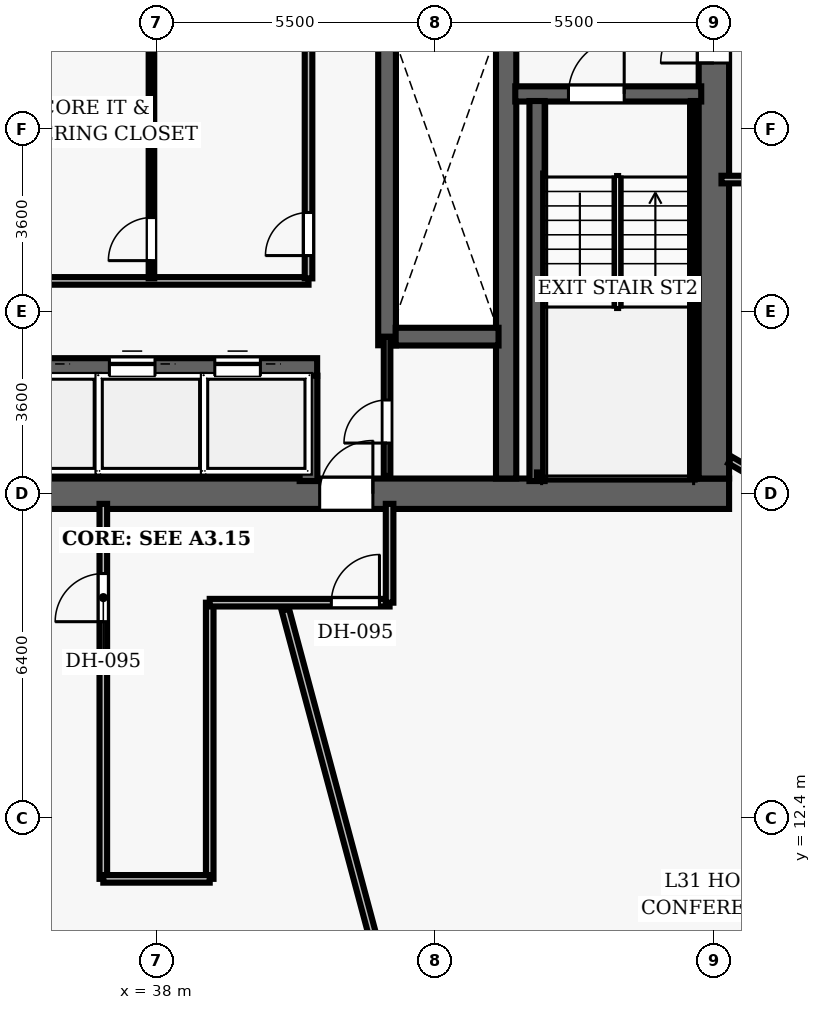
"""IFC4 building model, lengths in metres.
Left out: names, types, materials, properties, quantities, classifications, styles, units other than length and angle.
Written with IfcOpenShell. Run it as: python <this file> out.ifc"""

import sys

from ifc_helpers import new_model, si_unit, direction, frame, frame_2d, origin, place, context, subcontext, project, spatial, rectangle, extrude, element, fill, save


model = new_model("IFC4")
c1 = context("Model", 3, precision=1e-05, world=origin(), true_north=direction((0.0, 1.0)))
c2 = subcontext(c1, "Body", "Model", "MODEL_VIEW")
j1 = project(units=[si_unit("LENGTHUNIT", "METRE"), si_unit("PLANEANGLEUNIT", "RADIAN")], contexts=[c1])
p1 = place(None, origin())
s1 = spatial("IfcSite", under=j1, at=p1, CompositionType="ELEMENT")
p2 = place(p1, origin())
s2 = spatial("IfcBuilding", under=s1, at=p2, CompositionType="ELEMENT")
p3 = place(p2, frame((0.0, 0.0, 127.3)))
s3 = spatial("IfcBuildingStorey", under=s2, at=p3, CompositionType="ELEMENT", Elevation=127.3)
p4 = place(p3, frame((26.7, 18.8, 0.0), z_axis=(0.0, 0.0, 1.0), x_axis=(1.0, 0.0, 0.0)))
e1 = element("IfcWall", 1, at=p4, inside=s3, PredefinedType="SHEAR", context=c2, shape_type="SweptSolid", body=[
    extrude(rectangle(XDim=22.6, YDim=0.6, at=frame_2d((11.3, 0.0))), origin(), (0.0, 0.0, 1.0), 3.5),
])
p5 = place(p4, frame((14.52, 0.0, 0.0)))
e2 = element("IfcOpeningElement", 2, at=p5, cuts=e1, PredefinedType="OPENING", context=c2, shape_type="SweptSolid", body=[
    extrude(rectangle(XDim=1.05, YDim=2.15, at=frame_2d((0.525, 1.075))), frame((0.0, 0.31, 0.0), z_axis=(0.0, -1.0, 0.0), x_axis=(1.0, 0.0, 0.0)), (0.0, 0.0, 1.0), 0.62),
])
p6 = place(p3, frame((49.0, 19.1, 0.0), z_axis=(0.0, 0.0, 1.0), x_axis=(0.0, 1.0, 0.0)))
e3 = element("IfcWall", 3, at=p6, inside=s3, PredefinedType="SHEAR", context=c2, shape_type="SweptSolid", body=[
    extrude(rectangle(XDim=13.8, YDim=0.6, at=frame_2d((6.9, 0.0))), origin(), (0.0, 0.0, 1.0), 3.5),
])
p7 = place(p6, frame((8.2, 0.0, 0.0)))
e4 = element("IfcOpeningElement", 4, at=p7, cuts=e3, PredefinedType="OPENING", context=c2, shape_type="SweptSolid", body=[
    extrude(rectangle(XDim=1.05, YDim=2.15, at=frame_2d((0.525, 1.075))), frame((0.0, 0.31, 0.0), z_axis=(0.0, -1.0, 0.0), x_axis=(1.0, 0.0, 0.0)), (0.0, 0.0, 1.0), 0.62),
])
p8 = place(p3, frame((44.9, 19.1, 0.0), z_axis=(0.0, 0.0, 1.0), x_axis=(0.0, 1.0, 0.0)))
e5 = element("IfcWall", 5, at=p8, inside=s3, PredefinedType="SHEAR", context=c2, shape_type="SweptSolid", body=[
    extrude(rectangle(XDim=13.8, YDim=0.4, at=frame_2d((6.9, 0.0))), origin(), (0.0, 0.0, 1.0), 3.5),
])
p9 = place(p3, frame((45.08, 26.69, 0.0), z_axis=(0.0, 0.0, 1.0), x_axis=(1.0, 0.0, 0.0)))
e6 = element("IfcWall", 6, at=p9, inside=s3, PredefinedType="SHEAR", context=c2, shape_type="SweptSolid", body=[
    extrude(rectangle(XDim=3.67, YDim=0.3, at=frame_2d((1.835, 0.0))), origin(), (0.0, 0.0, 1.0), 3.5),
])
p10 = place(p9, frame((1.05, 0.0, 0.0)))
e7 = element("IfcOpeningElement", 7, at=p10, cuts=e6, PredefinedType="OPENING", context=c2, shape_type="SweptSolid", body=[
    extrude(rectangle(XDim=1.1, YDim=2.15, at=frame_2d((0.55, 1.075))), frame((0.0, 0.16, 0.0), z_axis=(0.0, -1.0, 0.0), x_axis=(1.0, 0.0, 0.0)), (0.0, 0.0, 1.0), 0.32),
])
p11 = place(p3, frame((45.51, 19.05, 0.0), z_axis=(0.0, 0.0, 1.0), x_axis=(0.0, 1.0, 0.0)))
e8 = element("IfcWall", 8, at=p11, inside=s3, PredefinedType="SHEAR", context=c2, shape_type="SweptSolid", body=[
    extrude(rectangle(XDim=7.5, YDim=0.3, at=frame_2d((3.75, 0.0))), origin(), (0.0, 0.0, 1.0), 3.5),
])
p12 = place(p3, frame((48.605, 19.1, 0.0), z_axis=(0.0, 0.0, 1.0), x_axis=(0.0, 1.0, 0.0)))
e9 = element("IfcWall", 9, at=p12, inside=s3, PredefinedType="SHEAR", context=c2, shape_type="SweptSolid", body=[
    extrude(rectangle(XDim=7.45, YDim=0.12, at=frame_2d((3.725, 0.0))), origin(), (0.0, 0.0, 1.0), 3.5),
])
p13 = place(p3, frame((45.51, 19.16, 0.0), z_axis=(0.0, 0.0, 1.0), x_axis=(1.0, 0.0, 0.0)))
e10 = element("IfcWall", 10, at=p13, inside=s3, PredefinedType="SHEAR", context=c2, shape_type="SweptSolid", body=[
    extrude(rectangle(XDim=3.095, YDim=0.12, at=frame_2d((1.547, 0.0))), origin(), (0.0, 0.0, 1.0), 3.5),
])
p14 = place(p3, frame((42.55, 21.73, 0.0), z_axis=(0.0, 0.0, 1.0), x_axis=(0.0, 1.0, 0.0)))
e11 = element("IfcWall", 11, at=p14, inside=s3, PredefinedType="SHEAR", context=c2, shape_type="SweptSolid", body=[
    extrude(rectangle(XDim=6.54, YDim=0.35, at=frame_2d((3.27, 0.0))), origin(), (0.0, 0.0, 1.0), 2.675),
])
p15 = place(p3, frame((42.72, 21.9, 0.0), z_axis=(0.0, 0.0, 1.0), x_axis=(1.0, 0.0, 0.0)))
e12 = element("IfcWall", 12, at=p15, inside=s3, PredefinedType="SHEAR", context=c2, shape_type="SweptSolid", body=[
    extrude(rectangle(XDim=2.03, YDim=0.35, at=frame_2d((1.015, 0.0))), origin(), (0.0, 0.0, 1.0), 2.675),
])
p16 = place(p3, frame((34.49, 21.3, 0.0), z_axis=(0.0, 0.0, 1.0), x_axis=(1.0, 0.0, 0.0)))
e13 = element("IfcWall", 13, at=p16, inside=s3, PredefinedType="SHEAR", context=c2, shape_type="SweptSolid", body=[
    extrude(rectangle(XDim=6.68, YDim=0.35, at=frame_2d((3.34, 0.0))), origin(), (0.0, 0.0, 1.0), 2.675),
])
p17 = place(p16, frame((0.5, 0.0, 0.0)))
e14 = element("IfcOpeningElement", 14, at=p17, cuts=e13, PredefinedType="OPENING", context=c2, shape_type="SweptSolid", body=[
    extrude(rectangle(XDim=0.9, YDim=2.15, at=frame_2d((0.45, 1.075))), frame((0.0, 0.185, 0.0), z_axis=(0.0, -1.0, 0.0), x_axis=(1.0, 0.0, 0.0)), (0.0, 0.0, 1.0), 0.37),
])
p18 = place(p16, frame((2.58, 0.0, 0.0)))
e15 = element("IfcOpeningElement", 15, at=p18, cuts=e13, PredefinedType="OPENING", context=c2, shape_type="SweptSolid", body=[
    extrude(rectangle(XDim=0.9, YDim=2.15, at=frame_2d((0.45, 1.075))), frame((0.0, 0.185, 0.0), z_axis=(0.0, -1.0, 0.0), x_axis=(1.0, 0.0, 0.0)), (0.0, 0.0, 1.0), 0.37),
])
p19 = place(p16, frame((4.66, 0.0, 0.0)))
e16 = element("IfcOpeningElement", 16, at=p19, cuts=e13, PredefinedType="OPENING", context=c2, shape_type="SweptSolid", body=[
    extrude(rectangle(XDim=0.9, YDim=2.15, at=frame_2d((0.45, 1.075))), frame((0.0, 0.185, 0.0), z_axis=(0.0, -1.0, 0.0), x_axis=(1.0, 0.0, 0.0)), (0.0, 0.0, 1.0), 0.37),
])
p20 = place(p3, frame((41.0, 19.05, 0.0), z_axis=(0.0, 0.0, 1.0), x_axis=(0.0, 1.0, 0.0)))
e17 = element("IfcWall", 17, at=p20, inside=s3, PredefinedType="SHEAR", context=c2, shape_type="SweptSolid", body=[
    extrude(rectangle(XDim=2.08, YDim=0.35, at=frame_2d((1.04, 0.0))), origin(), (0.0, 0.0, 1.0), 2.675),
])
p21 = place(p3, frame((34.75, 23.0, 0.0), z_axis=(0.0, 0.0, 1.0), x_axis=(1.0, 0.0, 0.0)))
e18 = element("IfcWall", 18, at=p21, inside=s3, PredefinedType="PARTITIONING", context=c2, shape_type="SweptSolid", body=[
    extrude(rectangle(XDim=6.25, YDim=0.15, at=frame_2d((3.125, 0.0))), origin(), (0.0, 0.0, 1.0), 2.675),
])
p22 = place(p3, frame((41.0, 23.05, 0.0), z_axis=(0.0, 0.0, 1.0), x_axis=(0.0, 1.0, 0.0)))
e19 = element("IfcWall", 19, at=p22, inside=s3, PredefinedType="PARTITIONING", context=c2, shape_type="SweptSolid", body=[
    extrude(rectangle(XDim=9.8, YDim=0.15, at=frame_2d((4.9, 0.0))), origin(), (0.0, 0.0, 1.0), 2.675),
])
p23 = place(p22, frame((5.35, 0.0, 0.0)))
e20 = element("IfcOpeningElement", 20, at=p23, cuts=e19, PredefinedType="OPENING", context=c2, shape_type="SweptSolid", body=[
    extrude(rectangle(XDim=0.85, YDim=2.1, at=frame_2d((0.425, 1.05))), frame((0.0, 0.085, 0.0), z_axis=(0.0, -1.0, 0.0), x_axis=(1.0, 0.0, 0.0)), (0.0, 0.0, 1.0), 0.17),
])
p24 = place(p22, frame((0.45, 0.0, 0.0)))
e21 = element("IfcOpeningElement", 21, at=p24, cuts=e19, PredefinedType="OPENING", context=c2, shape_type="SweptSolid", body=[
    extrude(rectangle(XDim=0.85, YDim=2.1, at=frame_2d((0.425, 1.05))), frame((0.0, 0.085, 0.0), z_axis=(0.0, -1.0, 0.0), x_axis=(1.0, 0.0, 0.0)), (0.0, 0.0, 1.0), 0.17),
])
p25 = place(p3, frame((37.9, 23.05, 0.0), z_axis=(0.0, 0.0, 1.0), x_axis=(0.0, 1.0, 0.0)))
e22 = element("IfcWall", 22, at=p25, inside=s3, PredefinedType="PARTITIONING", context=c2, shape_type="SweptSolid", body=[
    extrude(rectangle(XDim=4.9, YDim=0.11, at=frame_2d((2.45, 0.0))), origin(), (0.0, 0.0, 1.0), 2.675),
])
p26 = place(p25, frame((0.35, 0.0, 0.0)))
e23 = element("IfcOpeningElement", 23, at=p26, cuts=e22, PredefinedType="OPENING", context=c2, shape_type="SweptSolid", body=[
    extrude(rectangle(XDim=0.85, YDim=2.1, at=frame_2d((0.425, 1.05))), frame((0.0, 0.065, 0.0), z_axis=(0.0, -1.0, 0.0), x_axis=(1.0, 0.0, 0.0)), (0.0, 0.0, 1.0), 0.13),
])
p27 = place(p3, frame((42.55, 19.15, 0.0), z_axis=(0.0, 0.0, 1.0), x_axis=(0.0, 1.0, 0.0)))
e24 = element("IfcWall", 24, at=p27, inside=s3, PredefinedType="PARTITIONING", context=c2, shape_type="SweptSolid", body=[
    extrude(rectangle(XDim=2.75, YDim=0.13, at=frame_2d((1.375, 0.0))), origin(), (0.0, 0.0, 1.0), 2.675),
])
p28 = place(p27, frame((0.65, 0.0, 0.0)))
e25 = element("IfcOpeningElement", 25, at=p28, cuts=e24, PredefinedType="OPENING", context=c2, shape_type="SweptSolid", body=[
    extrude(rectangle(XDim=0.85, YDim=2.1, at=frame_2d((0.425, 1.05))), frame((0.0, 0.075, 0.0), z_axis=(0.0, -1.0, 0.0), x_axis=(1.0, 0.0, 0.0)), (0.0, 0.0, 1.0), 0.15),
])
p29 = place(p3, frame((49.15, 25.0, 0.0), z_axis=(0.0, 0.0, 1.0), x_axis=(1.0, 0.0, 0.0)))
e26 = element("IfcWall", 26, at=p29, inside=s3, PredefinedType="PARTITIONING", context=c2, shape_type="SweptSolid", body=[
    extrude(rectangle(XDim=12.35, YDim=0.15, at=frame_2d((6.175, 0.0))), origin(), (0.0, 0.0, 1.0), 2.675),
])
p30 = place(p29, frame((2.613, 0.0, 0.0)))
e27 = element("IfcOpeningElement", 27, at=p30, cuts=e26, PredefinedType="OPENING", context=c2, shape_type="SweptSolid", body=[
    extrude(rectangle(XDim=0.95, YDim=2.15, at=frame_2d((0.475, 1.075))), frame((0.0, 0.085, 0.0), z_axis=(0.0, -1.0, 0.0), x_axis=(1.0, 0.0, 0.0)), (0.0, 0.0, 1.0), 0.17),
])
p31 = place(p3, frame((36.95, 11.2, 0.0), z_axis=(0.0, 0.0, 1.0), x_axis=(0.0, 1.0, 0.0)))
e28 = element("IfcWall", 28, at=p31, inside=s3, PredefinedType="PARTITIONING", context=c2, shape_type="SweptSolid", body=[
    extrude(rectangle(XDim=7.4, YDim=0.15, at=frame_2d((3.7, 0.0))), origin(), (0.0, 0.0, 1.0), 2.675),
])
p32 = place(p31, frame((5.075, 0.0, 0.0)))
e29 = element("IfcOpeningElement", 29, at=p32, cuts=e28, PredefinedType="OPENING", context=c2, shape_type="SweptSolid", body=[
    extrude(rectangle(XDim=0.95, YDim=2.15, at=frame_2d((0.475, 1.075))), frame((0.0, 0.085, 0.0), z_axis=(0.0, -1.0, 0.0), x_axis=(1.0, 0.0, 0.0)), (0.0, 0.0, 1.0), 0.17),
])
p33 = place(p3, frame((39.05, 11.2, 0.0), z_axis=(0.0, 0.0, 1.0), x_axis=(0.0, 1.0, 0.0)))
e30 = element("IfcWall", 30, at=p33, inside=s3, PredefinedType="PARTITIONING", context=c2, shape_type="SweptSolid", body=[
    extrude(rectangle(XDim=5.45, YDim=0.15, at=frame_2d((2.725, 0.0))), origin(), (0.0, 0.0, 1.0), 2.675),
])
p34 = place(p3, frame((39.05, 16.65, 0.0), z_axis=(0.0, 0.0, 1.0), x_axis=(1.0, 0.0, 0.0)))
e31 = element("IfcWall", 31, at=p34, inside=s3, PredefinedType="PARTITIONING", context=c2, shape_type="SweptSolid", body=[
    extrude(rectangle(XDim=3.55, YDim=0.15, at=frame_2d((1.775, 0.0))), origin(), (0.0, 0.0, 1.0), 2.675),
])
p35 = place(p34, frame((2.4, 0.0, 0.0)))
e32 = element("IfcOpeningElement", 32, at=p35, cuts=e31, PredefinedType="OPENING", context=c2, shape_type="SweptSolid", body=[
    extrude(rectangle(XDim=0.95, YDim=2.15, at=frame_2d((0.475, 1.075))), frame((0.0, 0.085, 0.0), z_axis=(0.0, -1.0, 0.0), x_axis=(1.0, 0.0, 0.0)), (0.0, 0.0, 1.0), 0.17),
])
p36 = place(p3, frame((42.6, 16.65, 0.0), z_axis=(0.0, 0.0, 1.0), x_axis=(0.0, 1.0, 0.0)))
e33 = element("IfcWall", 33, at=p36, inside=s3, PredefinedType="PARTITIONING", context=c2, shape_type="SweptSolid", body=[
    extrude(rectangle(XDim=1.95, YDim=0.15, at=frame_2d((0.975, 0.0))), origin(), (0.0, 0.0, 1.0), 2.675),
])
p37 = place(p3, frame((36.95, 11.2, 0.0), z_axis=(0.0, 0.0, 1.0), x_axis=(1.0, 0.0, 0.0)))
e34 = element("IfcWall", 34, at=p37, inside=s3, PredefinedType="PARTITIONING", context=c2, shape_type="SweptSolid", body=[
    extrude(rectangle(XDim=2.1, YDim=0.15, at=frame_2d((1.05, 0.0))), origin(), (0.0, 0.0, 1.0), 2.675),
])
p38 = place(p3, frame((40.543, 16.51, 0.0), z_axis=(0.0, 0.0, 1.0), x_axis=(0.258819472716, -0.96592571171, 0.0)))
e35 = element("IfcWall", 35, at=p38, inside=s3, PredefinedType="PARTITIONING", context=c2, shape_type="SweptSolid", body=[
    extrude(rectangle(XDim=15.025, YDim=0.15, at=frame_2d((7.512, 0.0))), origin(), (0.0, 0.0, 1.0), 2.675),
])
p39 = place(p3, frame((49.32, 19.464, 0.0), z_axis=(0.0, 0.0, 1.0), x_axis=(0.866026939975, -0.499997339231, 0.0)))
e36 = element("IfcWall", 36, at=p39, inside=s3, PredefinedType="PARTITIONING", context=c2, shape_type="SweptSolid", body=[
    extrude(rectangle(XDim=17.272, YDim=0.15, at=frame_2d((8.636, 0.0))), origin(), (0.0, 0.0, 1.0), 2.675),
])
p40 = place(p10, origin())
e37 = element("IfcDoor", 37, at=p40, inside=s3, OperationType="SINGLE_SWING_RIGHT", PredefinedType="DOOR", context=c2, shape_type="SweptSolid", body=[
    extrude(rectangle(XDim=1.1, YDim=2.15, at=frame_2d((0.55, 1.075))), frame((0.0, 0.025, 0.0), z_axis=(0.0, -1.0, 0.0), x_axis=(1.0, 0.0, 0.0)), (0.0, 0.0, 1.0), 0.05),
])
fill(e7, e37)
p41 = place(p7, origin())
e38 = element("IfcDoor", 38, at=p41, inside=s3, OperationType="SINGLE_SWING_LEFT", PredefinedType="DOOR", context=c2, shape_type="SweptSolid", body=[
    extrude(rectangle(XDim=1.05, YDim=2.15, at=frame_2d((0.525, 1.075))), frame((0.0, 0.025, 0.0), z_axis=(0.0, -1.0, 0.0), x_axis=(1.0, 0.0, 0.0)), (0.0, 0.0, 1.0), 0.05),
])
fill(e4, e38)
p42 = place(p5, origin())
e39 = element("IfcDoor", 39, at=p42, inside=s3, OperationType="SINGLE_SWING_RIGHT", PredefinedType="DOOR", context=c2, shape_type="SweptSolid", body=[
    extrude(rectangle(XDim=1.05, YDim=2.15, at=frame_2d((0.525, 1.075))), frame((0.0, 0.025, 0.0), z_axis=(0.0, -1.0, 0.0), x_axis=(1.0, 0.0, 0.0)), (0.0, 0.0, 1.0), 0.05),
])
fill(e2, e39)
p43 = place(p24, origin())
e40 = element("IfcDoor", 40, at=p43, inside=s3, OperationType="SINGLE_SWING_LEFT", PredefinedType="DOOR", context=c2, shape_type="SweptSolid", body=[
    extrude(rectangle(XDim=0.85, YDim=2.1, at=frame_2d((0.425, 1.05))), frame((0.0, 0.025, 0.0), z_axis=(0.0, -1.0, 0.0), x_axis=(1.0, 0.0, 0.0)), (0.0, 0.0, 1.0), 0.05),
])
fill(e21, e40)
p44 = place(p26, origin())
e41 = element("IfcDoor", 41, at=p44, inside=s3, OperationType="SINGLE_SWING_LEFT", PredefinedType="DOOR", context=c2, shape_type="SweptSolid", body=[
    extrude(rectangle(XDim=0.85, YDim=2.1, at=frame_2d((0.425, 1.05))), frame((0.0, 0.025, 0.0), z_axis=(0.0, -1.0, 0.0), x_axis=(1.0, 0.0, 0.0)), (0.0, 0.0, 1.0), 0.05),
])
fill(e23, e41)
p45 = place(p28, origin())
e42 = element("IfcDoor", 42, at=p45, inside=s3, OperationType="SINGLE_SWING_LEFT", PredefinedType="DOOR", context=c2, shape_type="SweptSolid", body=[
    extrude(rectangle(XDim=0.85, YDim=2.1, at=frame_2d((0.425, 1.05))), frame((0.0, 0.025, 0.0), z_axis=(0.0, -1.0, 0.0), x_axis=(1.0, 0.0, 0.0)), (0.0, 0.0, 1.0), 0.05),
])
fill(e25, e42)
p46 = place(p32, origin())
e43 = element("IfcDoor", 43, at=p46, inside=s3, OperationType="SINGLE_SWING_LEFT", PredefinedType="DOOR", context=c2, shape_type="SweptSolid", body=[
    extrude(rectangle(XDim=0.95, YDim=2.15, at=frame_2d((0.475, 1.075))), frame((0.0, 0.025, 0.0), z_axis=(0.0, -1.0, 0.0), x_axis=(1.0, 0.0, 0.0)), (0.0, 0.0, 1.0), 0.05),
])
fill(e29, e43)
p47 = place(p35, origin())
e44 = element("IfcDoor", 44, at=p47, inside=s3, OperationType="SINGLE_SWING_RIGHT", PredefinedType="DOOR", context=c2, shape_type="SweptSolid", body=[
    extrude(rectangle(XDim=0.95, YDim=2.15, at=frame_2d((0.475, 1.075))), frame((0.0, 0.025, 0.0), z_axis=(0.0, -1.0, 0.0), x_axis=(1.0, 0.0, 0.0)), (0.0, 0.0, 1.0), 0.05),
])
fill(e32, e44)
p48 = place(p18, origin())
e45 = element("IfcDoor", 45, at=p48, inside=s3, OperationType="SLIDING_TO_LEFT", PredefinedType="DOOR", context=c2, shape_type="SweptSolid", body=[
    extrude(rectangle(XDim=0.9, YDim=2.15, at=frame_2d((0.45, 1.075))), frame((0.0, 0.025, 0.0), z_axis=(0.0, -1.0, 0.0), x_axis=(1.0, 0.0, 0.0)), (0.0, 0.0, 1.0), 0.05),
])
fill(e15, e45)
p49 = place(p19, origin())
e46 = element("IfcDoor", 46, at=p49, inside=s3, OperationType="SLIDING_TO_LEFT", PredefinedType="DOOR", context=c2, shape_type="SweptSolid", body=[
    extrude(rectangle(XDim=0.9, YDim=2.15, at=frame_2d((0.45, 1.075))), frame((0.0, 0.025, 0.0), z_axis=(0.0, -1.0, 0.0), x_axis=(1.0, 0.0, 0.0)), (0.0, 0.0, 1.0), 0.05),
])
fill(e16, e46)
save(model, sys.argv[1])
